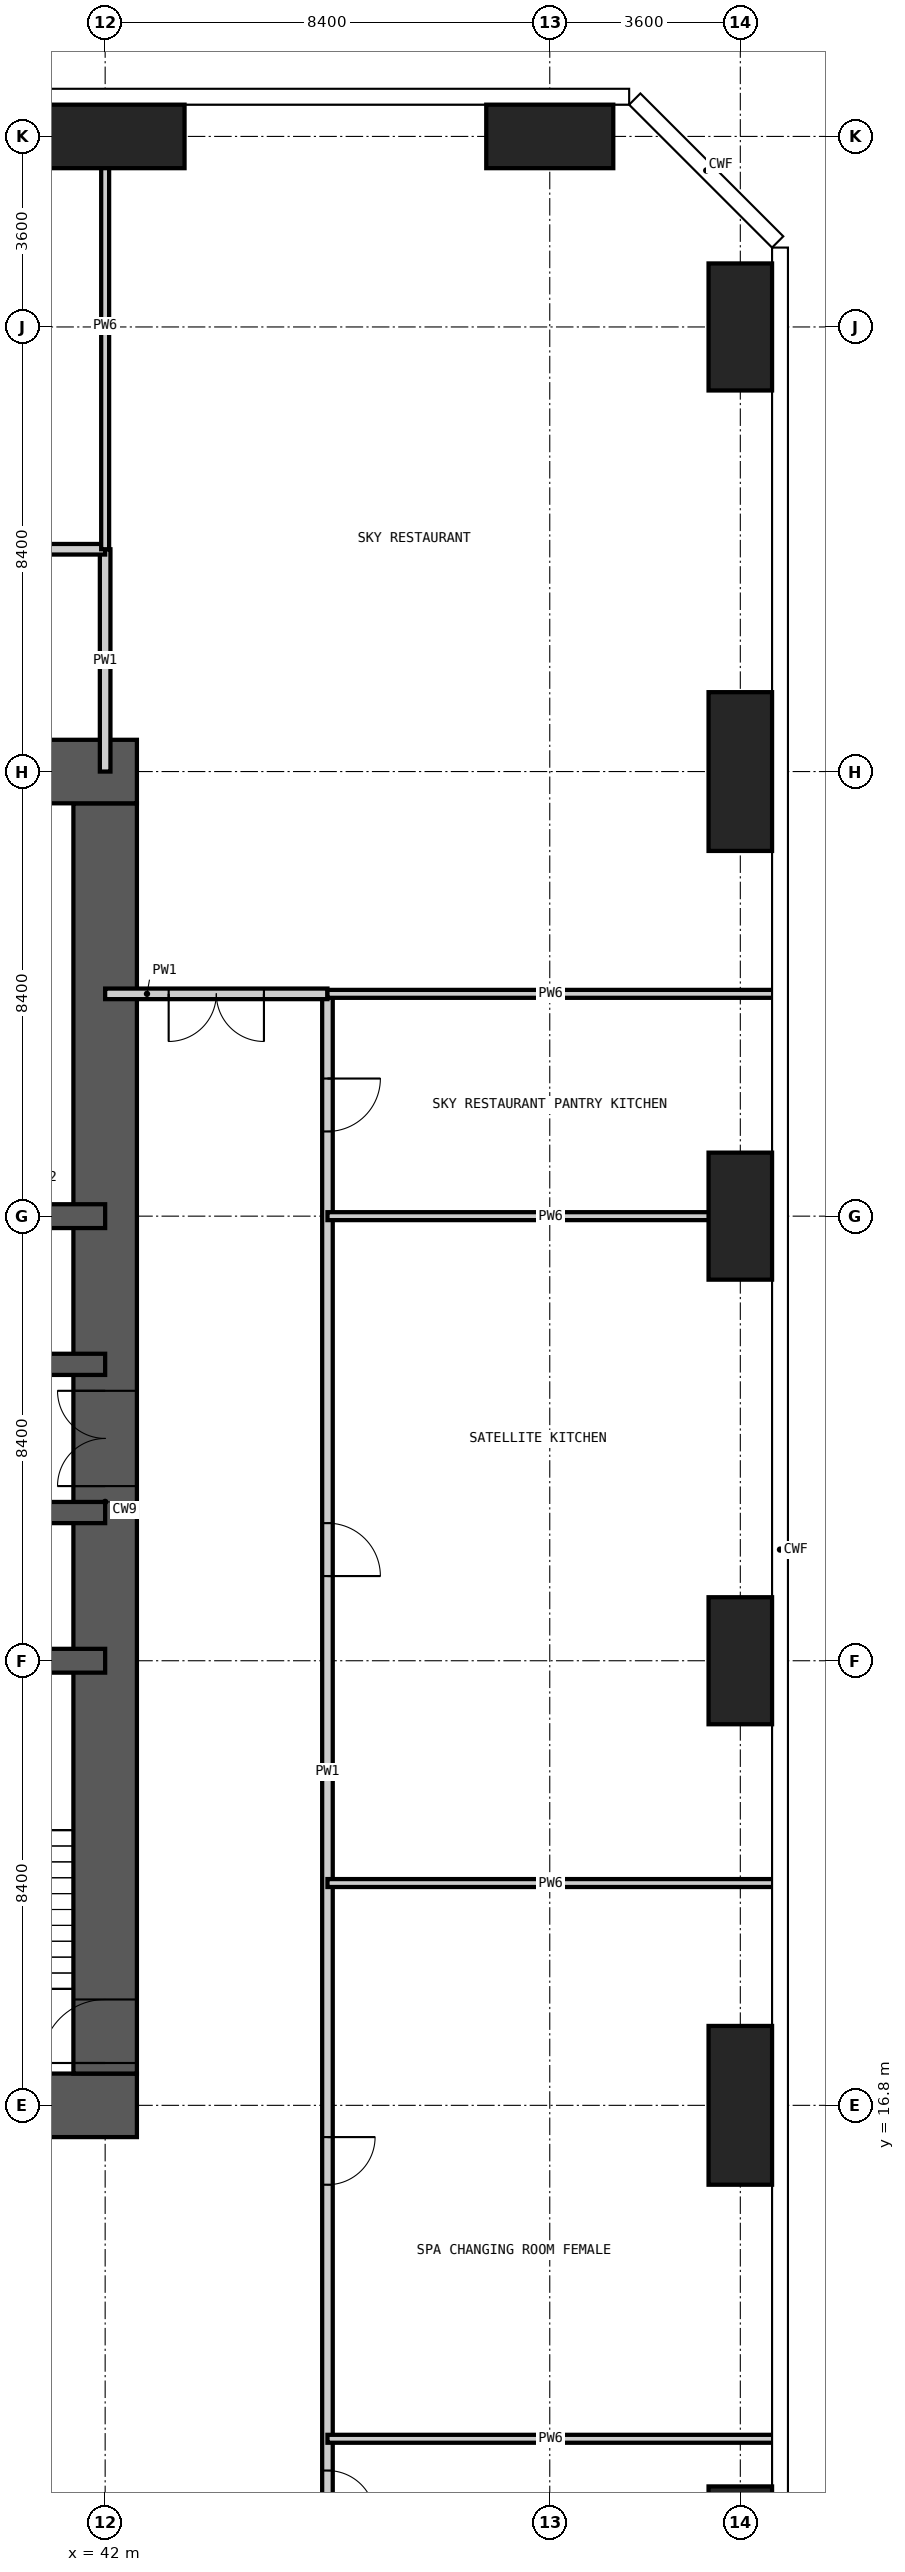
"""IFC4 building model, lengths in metres.
Left out: names, types, materials, properties, quantities, classifications, styles, units other than length and angle.
Written with IfcOpenShell. Run it as: python <this file> out.ifc"""

import sys

from ifc_helpers import new_model, si_unit, direction, frame, frame_2d, origin, origin_2d, place, context, subcontext, project, spatial, rectangle, extrude, element, fill, save


model = new_model("IFC4")
c1 = context("Model", 3, precision=1e-05, world=origin(), true_north=direction((0.0, 1.0)))
c2 = subcontext(c1, "Body", "Model", "MODEL_VIEW")
j1 = project(units=[si_unit("LENGTHUNIT", "METRE"), si_unit("PLANEANGLEUNIT", "RADIAN")], contexts=[c1])
p1 = place(None, origin())
s1 = spatial("IfcSite", under=j1, at=p1, CompositionType="ELEMENT")
p2 = place(p1, origin())
s2 = spatial("IfcBuilding", under=s1, at=p2, CompositionType="ELEMENT")
p3 = place(p2, frame((0.0, 0.0, 147.6)))
s3 = spatial("IfcBuildingStorey", under=s2, at=p3, CompositionType="ELEMENT", Elevation=147.6)
p4 = place(p3, frame((42.0, 54.0, -0.35), z_axis=(0.0, 0.0, 1.0), x_axis=(1.0, 0.0, 0.0)))
e1 = element("IfcColumn", 1, at=p4, inside=s3, PredefinedType="COLUMN", context=c2, shape_type="SweptSolid", body=[
    extrude(rectangle(XDim=3.0, YDim=1.2, at=origin_2d()), origin(), (0.0, 0.0, 1.0), 5.95),
])
p5 = place(p3, frame((50.4, 54.0, -0.35), z_axis=(0.0, 0.0, 1.0), x_axis=(1.0, 0.0, 0.0)))
e2 = element("IfcColumn", 2, at=p5, inside=s3, PredefinedType="COLUMN", context=c2, shape_type="SweptSolid", body=[
    extrude(rectangle(XDim=2.4, YDim=1.2, at=origin_2d()), origin(), (0.0, 0.0, 1.0), 5.95),
])
p6 = place(p3, frame((54.0, 8.4, -0.35), z_axis=(0.0, 0.0, 1.0), x_axis=(1.0, 0.0, 0.0)))
e3 = element("IfcColumn", 3, at=p6, inside=s3, PredefinedType="COLUMN", context=c2, shape_type="SweptSolid", body=[
    extrude(rectangle(XDim=1.2, YDim=2.4, at=origin_2d()), origin(), (0.0, 0.0, 1.0), 5.95),
])
p7 = place(p3, frame((54.0, 16.8, -0.35), z_axis=(0.0, 0.0, 1.0), x_axis=(1.0, 0.0, 0.0)))
e4 = element("IfcColumn", 4, at=p7, inside=s3, PredefinedType="COLUMN", context=c2, shape_type="SweptSolid", body=[
    extrude(rectangle(XDim=1.2, YDim=3.0, at=origin_2d()), origin(), (0.0, 0.0, 1.0), 5.95),
])
for number, where, z_axis, x_axis in (
    (5, (54.0, 25.2, -0.35), (0.0, 0.0, 1.0), (1.0, 0.0, 0.0)),
    (6, (54.0, 33.6, -0.35), (0.0, 0.0, 1.0), (1.0, 0.0, 0.0)),
):
    element("IfcColumn", number, at=place(p3, frame(where, z_axis=z_axis, x_axis=x_axis)), inside=s3, PredefinedType="COLUMN", context=c2, shape_type="SweptSolid", body=[
        extrude(rectangle(XDim=1.2, YDim=2.4, at=origin_2d()), origin(), (0.0, 0.0, 1.0), 5.95),
    ])
p8 = place(p3, frame((54.0, 42.0, -0.35), z_axis=(0.0, 0.0, 1.0), x_axis=(1.0, 0.0, 0.0)))
e7 = element("IfcColumn", 7, at=p8, inside=s3, PredefinedType="COLUMN", context=c2, shape_type="SweptSolid", body=[
    extrude(rectangle(XDim=1.2, YDim=3.0, at=origin_2d()), origin(), (0.0, 0.0, 1.0), 5.95),
])
p9 = place(p3, frame((54.0, 50.4, -0.35), z_axis=(0.0, 0.0, 1.0), x_axis=(1.0, 0.0, 0.0)))
e8 = element("IfcColumn", 8, at=p9, inside=s3, PredefinedType="COLUMN", context=c2, shape_type="SweptSolid", body=[
    extrude(rectangle(XDim=1.2, YDim=2.4, at=origin_2d()), origin(), (0.0, 0.0, 1.0), 5.95),
])
p10 = place(p3, frame((16.2, 16.8, -0.35), z_axis=(0.0, 0.0, 1.0), x_axis=(1.0, 0.0, 0.0)))
e9 = element("IfcWall", 9, at=p10, inside=s3, PredefinedType="SHEAR", context=c2, shape_type="SweptSolid", body=[
    extrude(rectangle(XDim=26.4, YDim=1.2, at=frame_2d((13.2, 0.0))), origin(), (0.0, 0.0, 1.0), 5.95),
])
p11 = place(p10, frame((12.7, 0.0, 0.35)))
e10 = element("IfcOpeningElement", 10, at=p11, cuts=e9, PredefinedType="OPENING", context=c2, shape_type="SweptSolid", body=[
    extrude(rectangle(XDim=1.0, YDim=2.1, at=frame_2d((0.5, 1.05))), frame((0.0, 0.61, 0.0), z_axis=(0.0, -1.0, 0.0), x_axis=(1.0, 0.0, 0.0)), (0.0, 0.0, 1.0), 1.22),
])
p12 = place(p10, frame((19.0, 0.0, 0.35)))
e11 = element("IfcOpeningElement", 11, at=p12, cuts=e9, PredefinedType="OPENING", context=c2, shape_type="SweptSolid", body=[
    extrude(rectangle(XDim=1.0, YDim=2.1, at=frame_2d((0.5, 1.05))), frame((0.0, 0.61, 0.0), z_axis=(0.0, -1.0, 0.0), x_axis=(1.0, 0.0, 0.0)), (0.0, 0.0, 1.0), 1.22),
])
p13 = place(p3, frame((42.0, 17.4, -0.35), z_axis=(0.0, 0.0, 1.0), x_axis=(0.0, 1.0, 0.0)))
e12 = element("IfcWall", 12, at=p13, inside=s3, PredefinedType="SHEAR", context=c2, shape_type="SweptSolid", body=[
    extrude(rectangle(XDim=24.0, YDim=1.2, at=frame_2d((12.0, 0.0))), origin(), (0.0, 0.0, 1.0), 5.95),
])
p14 = place(p13, frame((0.2, 0.0, 0.35)))
e13 = element("IfcOpeningElement", 13, at=p14, cuts=e12, PredefinedType="OPENING", context=c2, shape_type="SweptSolid", body=[
    extrude(rectangle(XDim=1.2, YDim=2.2, at=frame_2d((0.6, 1.1))), frame((0.0, 0.61, 0.0), z_axis=(0.0, -1.0, 0.0), x_axis=(1.0, 0.0, 0.0)), (0.0, 0.0, 1.0), 1.22),
])
p15 = place(p13, frame((11.1, 0.0, 0.35)))
e14 = element("IfcOpeningElement", 14, at=p15, cuts=e12, PredefinedType="OPENING", context=c2, shape_type="SweptSolid", body=[
    extrude(rectangle(XDim=1.8, YDim=2.2, at=frame_2d((0.9, 1.1))), frame((0.0, 0.61, 0.0), z_axis=(0.0, -1.0, 0.0), x_axis=(1.0, 0.0, 0.0)), (0.0, 0.0, 1.0), 1.22),
])
p16 = place(p3, frame((42.6, 42.0, -0.35), z_axis=(0.0, 0.0, 1.0), x_axis=(-1.0, 0.0, 0.0)))
e15 = element("IfcWall", 15, at=p16, inside=s3, PredefinedType="SHEAR", context=c2, shape_type="SweptSolid", body=[
    extrude(rectangle(XDim=26.4, YDim=1.2, at=frame_2d((13.2, 0.0))), origin(), (0.0, 0.0, 1.0), 5.95),
])
p17 = place(p16, frame((21.1, 0.0, 0.35)))
e16 = element("IfcOpeningElement", 16, at=p17, cuts=e15, PredefinedType="OPENING", context=c2, shape_type="SweptSolid", body=[
    extrude(rectangle(XDim=1.0, YDim=2.1, at=frame_2d((0.5, 1.05))), frame((0.0, 0.61, 0.0), z_axis=(0.0, -1.0, 0.0), x_axis=(1.0, 0.0, 0.0)), (0.0, 0.0, 1.0), 1.22),
])
p18 = place(p16, frame((10.5, 0.0, 0.35)))
e17 = element("IfcOpeningElement", 17, at=p18, cuts=e15, PredefinedType="OPENING", context=c2, shape_type="SweptSolid", body=[
    extrude(rectangle(XDim=1.2, YDim=2.2, at=frame_2d((0.6, 1.1))), frame((0.0, 0.61, 0.0), z_axis=(0.0, -1.0, 0.0), x_axis=(1.0, 0.0, 0.0)), (0.0, 0.0, 1.0), 1.22),
])
p19 = place(p16, frame((2.9, 0.0, 0.35)))
e18 = element("IfcOpeningElement", 18, at=p19, cuts=e15, PredefinedType="OPENING", context=c2, shape_type="SweptSolid", body=[
    extrude(rectangle(XDim=1.0, YDim=2.1, at=frame_2d((0.5, 1.05))), frame((0.0, 0.61, 0.0), z_axis=(0.0, -1.0, 0.0), x_axis=(1.0, 0.0, 0.0)), (0.0, 0.0, 1.0), 1.22),
])
p20 = place(p3, frame((33.6, 28.0, -0.35), z_axis=(0.0, 0.0, 1.0), x_axis=(1.0, 0.0, 0.0)))
e19 = element("IfcWall", 19, at=p20, inside=s3, PredefinedType="SHEAR", context=c2, shape_type="SweptSolid", body=[
    extrude(rectangle(XDim=8.4, YDim=0.4, at=frame_2d((4.2, 0.0))), origin(), (0.0, 0.0, 1.0), 5.95),
])
p21 = place(p20, frame((1.55, 0.0, 0.35)))
e20 = element("IfcOpeningElement", 20, at=p21, cuts=e19, PredefinedType="OPENING", context=c2, shape_type="SweptSolid", body=[
    extrude(rectangle(XDim=1.1, YDim=2.2, at=frame_2d((0.55, 1.1))), frame((0.0, 0.21, 0.0), z_axis=(0.0, -1.0, 0.0), x_axis=(1.0, 0.0, 0.0)), (0.0, 0.0, 1.0), 0.42),
])
p22 = place(p20, frame((5.75, 0.0, 0.35)))
e21 = element("IfcOpeningElement", 21, at=p22, cuts=e19, PredefinedType="OPENING", context=c2, shape_type="SweptSolid", body=[
    extrude(rectangle(XDim=1.1, YDim=2.2, at=frame_2d((0.55, 1.1))), frame((0.0, 0.21, 0.0), z_axis=(0.0, -1.0, 0.0), x_axis=(1.0, 0.0, 0.0)), (0.0, 0.0, 1.0), 0.42),
])
p23 = place(p3, frame((33.6, 30.8, -0.35), z_axis=(0.0, 0.0, 1.0), x_axis=(1.0, 0.0, 0.0)))
e22 = element("IfcWall", 22, at=p23, inside=s3, PredefinedType="SHEAR", context=c2, shape_type="SweptSolid", body=[
    extrude(rectangle(XDim=8.4, YDim=0.4, at=frame_2d((4.2, 0.0))), origin(), (0.0, 0.0, 1.0), 5.95),
])
p24 = place(p23, frame((1.55, 0.0, 0.35)))
e23 = element("IfcOpeningElement", 23, at=p24, cuts=e22, PredefinedType="OPENING", context=c2, shape_type="SweptSolid", body=[
    extrude(rectangle(XDim=1.1, YDim=2.2, at=frame_2d((0.55, 1.1))), frame((0.0, 0.21, 0.0), z_axis=(0.0, -1.0, 0.0), x_axis=(1.0, 0.0, 0.0)), (0.0, 0.0, 1.0), 0.42),
])
p25 = place(p23, frame((5.75, 0.0, 0.35)))
e24 = element("IfcOpeningElement", 24, at=p25, cuts=e22, PredefinedType="OPENING", context=c2, shape_type="SweptSolid", body=[
    extrude(rectangle(XDim=1.1, YDim=2.2, at=frame_2d((0.55, 1.1))), frame((0.0, 0.21, 0.0), z_axis=(0.0, -1.0, 0.0), x_axis=(1.0, 0.0, 0.0)), (0.0, 0.0, 1.0), 0.42),
])
p26 = place(p3, frame((16.8, 25.2, -0.35), z_axis=(0.0, 0.0, 1.0), x_axis=(1.0, 0.0, 0.0)))
e25 = element("IfcWall", 25, at=p26, inside=s3, PredefinedType="SHEAR", context=c2, shape_type="SweptSolid", body=[
    extrude(rectangle(XDim=25.2, YDim=0.45, at=frame_2d((12.6, 0.0))), origin(), (0.0, 0.0, 1.0), 5.95),
])
p27 = place(p3, frame((16.8, 33.6, -0.35), z_axis=(0.0, 0.0, 1.0), x_axis=(1.0, 0.0, 0.0)))
e26 = element("IfcWall", 26, at=p27, inside=s3, PredefinedType="SHEAR", context=c2, shape_type="SweptSolid", body=[
    extrude(rectangle(XDim=25.2, YDim=0.45, at=frame_2d((12.6, 0.0))), origin(), (0.0, 0.0, 1.0), 5.95),
])
p28 = place(p27, frame((14.2, 0.0, 0.35)))
e27 = element("IfcOpeningElement", 27, at=p28, cuts=e26, PredefinedType="OPENING", context=c2, shape_type="SweptSolid", body=[
    extrude(rectangle(XDim=1.0, YDim=2.1, at=frame_2d((0.5, 1.05))), frame((0.0, 0.235, 0.0), z_axis=(0.0, -1.0, 0.0), x_axis=(1.0, 0.0, 0.0)), (0.0, 0.0, 1.0), 0.47),
])
p29 = place(p3, frame((42.0, 42.0, 0.0), z_axis=(0.0, 0.0, 1.0), x_axis=(0.0, 1.0, 0.0)))
e28 = element("IfcWall", 28, at=p29, inside=s3, PredefinedType="PARTITIONING", context=c2, shape_type="SweptSolid", body=[
    extrude(rectangle(XDim=4.2, YDim=0.2, at=frame_2d((2.1, 0.0))), origin(), (0.0, 0.0, 1.0), 5.6),
])
p30 = place(p3, frame((46.2, 8.4, 0.0), z_axis=(0.0, 0.0, 1.0), x_axis=(0.0, 1.0, 0.0)))
e29 = element("IfcWall", 29, at=p30, inside=s3, PredefinedType="PARTITIONING", context=c2, shape_type="SweptSolid", body=[
    extrude(rectangle(XDim=29.4, YDim=0.2, at=frame_2d((14.7, 0.0))), origin(), (0.0, 0.0, 1.0), 5.6),
])
p31 = place(p30, frame((0.6, 0.0, 0.0)))
e30 = element("IfcOpeningElement", 30, at=p31, cuts=e29, PredefinedType="OPENING", context=c2, shape_type="SweptSolid", body=[
    extrude(rectangle(XDim=0.9, YDim=2.1, at=frame_2d((0.45, 1.05))), frame((0.0, 0.11, 0.0), z_axis=(0.0, -1.0, 0.0), x_axis=(1.0, 0.0, 0.0)), (0.0, 0.0, 1.0), 0.22),
])
p32 = place(p30, frame((6.9, 0.0, 0.0)))
e31 = element("IfcOpeningElement", 31, at=p32, cuts=e29, PredefinedType="OPENING", context=c2, shape_type="SweptSolid", body=[
    extrude(rectangle(XDim=0.9, YDim=2.1, at=frame_2d((0.45, 1.05))), frame((0.0, 0.11, 0.0), z_axis=(0.0, -1.0, 0.0), x_axis=(1.0, 0.0, 0.0)), (0.0, 0.0, 1.0), 0.22),
])
p33 = place(p30, frame((18.4, 0.0, 0.0)))
e32 = element("IfcOpeningElement", 32, at=p33, cuts=e29, PredefinedType="OPENING", context=c2, shape_type="SweptSolid", body=[
    extrude(rectangle(XDim=1.0, YDim=2.1, at=frame_2d((0.5, 1.05))), frame((0.0, 0.11, 0.0), z_axis=(0.0, -1.0, 0.0), x_axis=(1.0, 0.0, 0.0)), (0.0, 0.0, 1.0), 0.22),
])
p34 = place(p30, frame((26.8, 0.0, 0.0)))
e33 = element("IfcOpeningElement", 33, at=p34, cuts=e29, PredefinedType="OPENING", context=c2, shape_type="SweptSolid", body=[
    extrude(rectangle(XDim=1.0, YDim=2.1, at=frame_2d((0.5, 1.05))), frame((0.0, 0.11, 0.0), z_axis=(0.0, -1.0, 0.0), x_axis=(1.0, 0.0, 0.0)), (0.0, 0.0, 1.0), 0.22),
])
p35 = place(p3, frame((12.6, 46.2, 0.0), z_axis=(0.0, 0.0, 1.0), x_axis=(1.0, 0.0, 0.0)))
e34 = element("IfcWall", 34, at=p35, inside=s3, PredefinedType="PARTITIONING", context=c2, shape_type="SweptSolid", body=[
    extrude(rectangle(XDim=29.4, YDim=0.2, at=frame_2d((14.7, 0.0))), origin(), (0.0, 0.0, 1.0), 5.6),
])
p36 = place(p35, frame((5.55, 0.0, 0.0)))
e35 = element("IfcOpeningElement", 35, at=p36, cuts=e34, PredefinedType="OPENING", context=c2, shape_type="SweptSolid", body=[
    extrude(rectangle(XDim=0.9, YDim=2.1, at=frame_2d((0.45, 1.05))), frame((0.0, 0.11, 0.0), z_axis=(0.0, -1.0, 0.0), x_axis=(1.0, 0.0, 0.0)), (0.0, 0.0, 1.0), 0.22),
])
p37 = place(p35, frame((9.15, 0.0, 0.0)))
e36 = element("IfcOpeningElement", 36, at=p37, cuts=e34, PredefinedType="OPENING", context=c2, shape_type="SweptSolid", body=[
    extrude(rectangle(XDim=0.9, YDim=2.1, at=frame_2d((0.45, 1.05))), frame((0.0, 0.11, 0.0), z_axis=(0.0, -1.0, 0.0), x_axis=(1.0, 0.0, 0.0)), (0.0, 0.0, 1.0), 0.22),
])
p38 = place(p35, frame((12.1, 0.0, 0.0)))
e37 = element("IfcOpeningElement", 37, at=p38, cuts=e34, PredefinedType="OPENING", context=c2, shape_type="SweptSolid", body=[
    extrude(rectangle(XDim=1.0, YDim=2.1, at=frame_2d((0.5, 1.05))), frame((0.0, 0.11, 0.0), z_axis=(0.0, -1.0, 0.0), x_axis=(1.0, 0.0, 0.0)), (0.0, 0.0, 1.0), 0.22),
])
p39 = place(p35, frame((15.8, 0.0, 0.0)))
e38 = element("IfcOpeningElement", 38, at=p39, cuts=e34, PredefinedType="OPENING", context=c2, shape_type="SweptSolid", body=[
    extrude(rectangle(XDim=1.0, YDim=2.1, at=frame_2d((0.5, 1.05))), frame((0.0, 0.11, 0.0), z_axis=(0.0, -1.0, 0.0), x_axis=(1.0, 0.0, 0.0)), (0.0, 0.0, 1.0), 0.22),
])
p40 = place(p35, frame((20.975, 0.0, 0.0)))
e39 = element("IfcOpeningElement", 39, at=p40, cuts=e34, PredefinedType="OPENING", context=c2, shape_type="SweptSolid", body=[
    extrude(rectangle(XDim=1.0, YDim=2.1, at=frame_2d((0.5, 1.05))), frame((0.0, 0.11, 0.0), z_axis=(0.0, -1.0, 0.0), x_axis=(1.0, 0.0, 0.0)), (0.0, 0.0, 1.0), 0.22),
])
p41 = place(p35, frame((26.275, 0.0, 0.0)))
e40 = element("IfcOpeningElement", 40, at=p41, cuts=e34, PredefinedType="OPENING", context=c2, shape_type="SweptSolid", body=[
    extrude(rectangle(XDim=1.0, YDim=2.1, at=frame_2d((0.5, 1.05))), frame((0.0, 0.11, 0.0), z_axis=(0.0, -1.0, 0.0), x_axis=(1.0, 0.0, 0.0)), (0.0, 0.0, 1.0), 0.22),
])
p42 = place(p35, frame((1.6, 0.0, 0.0)))
e41 = element("IfcOpeningElement", 41, at=p42, cuts=e34, PredefinedType="OPENING", context=c2, shape_type="SweptSolid", body=[
    extrude(rectangle(XDim=1.0, YDim=2.1, at=frame_2d((0.5, 1.05))), frame((0.0, 0.11, 0.0), z_axis=(0.0, -1.0, 0.0), x_axis=(1.0, 0.0, 0.0)), (0.0, 0.0, 1.0), 0.22),
])
p43 = place(p3, frame((46.2, 37.8, 0.0), z_axis=(0.0, 0.0, 1.0), x_axis=(-1.0, 0.0, 0.0)))
e42 = element("IfcWall", 42, at=p43, inside=s3, PredefinedType="PARTITIONING", context=c2, shape_type="SweptSolid", body=[
    extrude(rectangle(XDim=4.2, YDim=0.2, at=frame_2d((2.1, 0.0))), origin(), (0.0, 0.0, 1.0), 5.6),
])
p44 = place(p43, frame((1.2, 0.0, 0.0)))
e43 = element("IfcOpeningElement", 43, at=p44, cuts=e42, PredefinedType="OPENING", context=c2, shape_type="SweptSolid", body=[
    extrude(rectangle(XDim=1.8, YDim=2.4, at=frame_2d((0.9, 1.2))), frame((0.0, 0.11, 0.0), z_axis=(0.0, -1.0, 0.0), x_axis=(1.0, 0.0, 0.0)), (0.0, 0.0, 1.0), 0.22),
])
for number, where, z_axis, x_axis in (
    (44, (42.0, 46.2, 0.0), (0.0, 0.0, 1.0), (0.0, 1.0, 0.0)),
    (45, (46.2, 10.5, 0.0), (0.0, 0.0, 1.0), (1.0, 0.0, 0.0)),
    (46, (46.2, 21.0, 0.0), (0.0, 0.0, 1.0), (1.0, 0.0, 0.0)),
    (47, (46.2, 33.6, 0.0), (0.0, 0.0, 1.0), (1.0, 0.0, 0.0)),
    (48, (46.2, 37.8, 0.0), (0.0, 0.0, 1.0), (1.0, 0.0, 0.0)),
):
    element("IfcWall", number, at=place(p3, frame(where, z_axis=z_axis, x_axis=x_axis)), inside=s3, PredefinedType="PARTITIONING", context=c2, shape_type="SweptSolid", body=[
        extrude(rectangle(XDim=8.438, YDim=0.15, at=frame_2d((4.219, 0.0))), origin(), (0.0, 0.0, 1.0), 5.6),
    ])
p45 = place(p14, origin())
e49 = element("IfcDoor", 49, at=p45, inside=s3, OperationType="SINGLE_SWING_LEFT", PredefinedType="DOOR", context=c2, shape_type="SweptSolid", body=[
    extrude(rectangle(XDim=1.2, YDim=2.2, at=frame_2d((0.6, 1.1))), frame((0.0, 0.025, 0.0), z_axis=(0.0, -1.0, 0.0), x_axis=(1.0, 0.0, 0.0)), (0.0, 0.0, 1.0), 0.05),
])
fill(e13, e49)
p46 = place(p15, origin())
e50 = element("IfcDoor", 50, at=p46, inside=s3, OperationType="DOUBLE_DOOR_DOUBLE_SWING", PredefinedType="DOOR", context=c2, shape_type="SweptSolid", body=[
    extrude(rectangle(XDim=1.8, YDim=2.2, at=frame_2d((0.9, 1.1))), frame((0.0, 0.025, 0.0), z_axis=(0.0, -1.0, 0.0), x_axis=(1.0, 0.0, 0.0)), (0.0, 0.0, 1.0), 0.05),
])
fill(e14, e50)
p47 = place(p31, frame((0.9, 0.0, 0.0), z_axis=(0.0, 0.0, 1.0), x_axis=(-1.0, 0.0, 0.0)))
e51 = element("IfcDoor", 51, at=p47, inside=s3, OperationType="SINGLE_SWING_RIGHT", PredefinedType="DOOR", context=c2, shape_type="SweptSolid", body=[
    extrude(rectangle(XDim=0.9, YDim=2.1, at=frame_2d((0.45, 1.05))), frame((0.0, 0.025, 0.0), z_axis=(0.0, -1.0, 0.0), x_axis=(1.0, 0.0, 0.0)), (0.0, 0.0, 1.0), 0.05),
])
fill(e30, e51)
p48 = place(p32, frame((0.9, 0.0, 0.0), z_axis=(0.0, 0.0, 1.0), x_axis=(-1.0, 0.0, 0.0)))
e52 = element("IfcDoor", 52, at=p48, inside=s3, OperationType="SINGLE_SWING_LEFT", PredefinedType="DOOR", context=c2, shape_type="SweptSolid", body=[
    extrude(rectangle(XDim=0.9, YDim=2.1, at=frame_2d((0.45, 1.05))), frame((0.0, 0.025, 0.0), z_axis=(0.0, -1.0, 0.0), x_axis=(1.0, 0.0, 0.0)), (0.0, 0.0, 1.0), 0.05),
])
fill(e31, e52)
p49 = place(p33, frame((1.0, 0.0, 0.0), z_axis=(0.0, 0.0, 1.0), x_axis=(-1.0, 0.0, 0.0)))
e53 = element("IfcDoor", 53, at=p49, inside=s3, OperationType="SINGLE_SWING_RIGHT", PredefinedType="DOOR", context=c2, shape_type="SweptSolid", body=[
    extrude(rectangle(XDim=1.0, YDim=2.1, at=frame_2d((0.5, 1.05))), frame((0.0, 0.025, 0.0), z_axis=(0.0, -1.0, 0.0), x_axis=(1.0, 0.0, 0.0)), (0.0, 0.0, 1.0), 0.05),
])
fill(e32, e53)
p50 = place(p34, frame((1.0, 0.0, 0.0), z_axis=(0.0, 0.0, 1.0), x_axis=(-1.0, 0.0, 0.0)))
e54 = element("IfcDoor", 54, at=p50, inside=s3, OperationType="SINGLE_SWING_LEFT", PredefinedType="DOOR", context=c2, shape_type="SweptSolid", body=[
    extrude(rectangle(XDim=1.0, YDim=2.1, at=frame_2d((0.5, 1.05))), frame((0.0, 0.025, 0.0), z_axis=(0.0, -1.0, 0.0), x_axis=(1.0, 0.0, 0.0)), (0.0, 0.0, 1.0), 0.05),
])
fill(e33, e54)
p51 = place(p44, origin())
e55 = element("IfcDoor", 55, at=p51, inside=s3, OperationType="DOUBLE_DOOR_DOUBLE_SWING", PredefinedType="DOOR", context=c2, shape_type="SweptSolid", body=[
    extrude(rectangle(XDim=1.8, YDim=2.4, at=frame_2d((0.9, 1.2))), frame((0.0, 0.025, 0.0), z_axis=(0.0, -1.0, 0.0), x_axis=(1.0, 0.0, 0.0)), (0.0, 0.0, 1.0), 0.05),
])
fill(e43, e55)
save(model, sys.argv[1])
